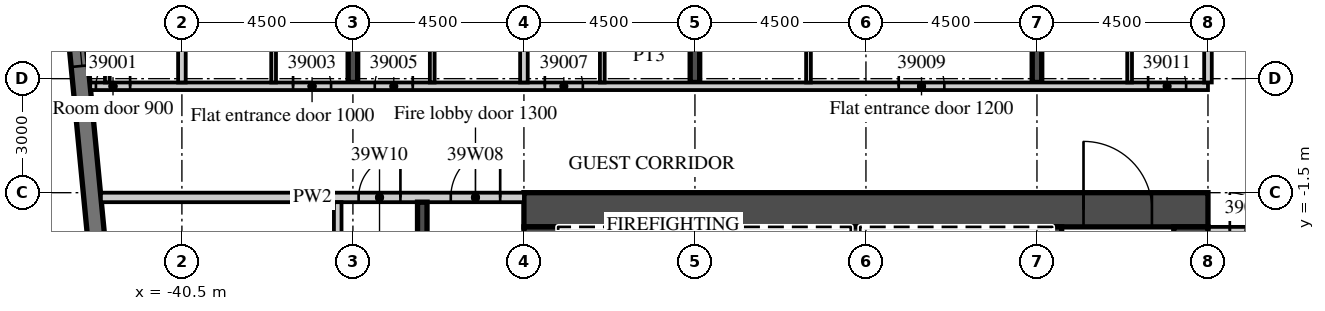
"""IFC4 building model, lengths in metres.
Left out: names, types, materials, properties, quantities, classifications, styles, units other than length and angle.
Written with IfcOpenShell. Run it as: python <this file> out.ifc"""

import sys

from ifc_helpers import new_model, si_unit, direction, frame, frame_2d, origin, place, context, subcontext, project, spatial, rectangle, extrude, element, fill, save


model = new_model("IFC4")
c1 = context("Model", 3, precision=1e-05, world=origin(), true_north=direction((0.0, 1.0)))
c2 = subcontext(c1, "Body", "Model", "MODEL_VIEW")
j1 = project(units=[si_unit("LENGTHUNIT", "METRE"), si_unit("PLANEANGLEUNIT", "RADIAN")], contexts=[c1])
p1 = place(None, origin())
s1 = spatial("IfcSite", under=j1, at=p1, CompositionType="ELEMENT")
p2 = place(p1, origin())
s2 = spatial("IfcBuilding", under=s1, at=p2, CompositionType="ELEMENT")
p3 = place(p2, frame((0.0, 0.0, 170.2)))
s3 = spatial("IfcBuildingStorey", under=s2, at=p3, CompositionType="ELEMENT", Elevation=170.2)
p4 = place(p3, frame((-36.0, 1.4, 0.0), z_axis=(0.0, 0.0, 1.0), x_axis=(0.0, 1.0, 0.0)))
e1 = element("IfcWall", 1, at=p4, inside=s3, PredefinedType="SHEAR", context=c2, shape_type="SweptSolid", body=[
    extrude(rectangle(XDim=15.401, YDim=0.25, at=frame_2d((7.701, 0.0))), origin(), (0.0, 0.0, 1.0), 3.3),
])
p5 = place(p3, frame((-27.0, 1.4, 0.0), z_axis=(0.0, 0.0, 1.0), x_axis=(0.0, 1.0, 0.0)))
e2 = element("IfcWall", 2, at=p5, inside=s3, PredefinedType="SHEAR", context=c2, shape_type="SweptSolid", body=[
    extrude(rectangle(XDim=16.268, YDim=0.25, at=frame_2d((8.134, 0.0))), origin(), (0.0, 0.0, 1.0), 3.3),
])
p6 = place(p3, frame((-18.0, 1.4, 0.0), z_axis=(0.0, 0.0, 1.0), x_axis=(0.0, 1.0, 0.0)))
e3 = element("IfcWall", 3, at=p6, inside=s3, PredefinedType="SHEAR", context=c2, shape_type="SweptSolid", body=[
    extrude(rectangle(XDim=17.134, YDim=0.25, at=frame_2d((8.567, 0.0))), origin(), (0.0, 0.0, 1.0), 3.3),
])
p7 = place(p3, frame((-44.214, 12.466, 0.0), z_axis=(0.0, 0.0, 1.0), x_axis=(0.095847314626, -0.995396047952, 0.0)))
e4 = element("IfcWall", 4, at=p7, inside=s3, PredefinedType="SOLIDWALL", context=c2, shape_type="SweptSolid", body=[
    extrude(rectangle(XDim=34.0, YDim=0.45, at=frame_2d((17.0, 0.0))), origin(), (0.0, 0.0, 1.0), 3.02),
])
p8 = place(p7, frame((2.865, 0.0, 0.45)))
e5 = element("IfcOpeningElement", 5, at=p8, cuts=e4, PredefinedType="OPENING", context=c2, shape_type="SweptSolid", body=[
    extrude(rectangle(XDim=3.3, YDim=2.25, at=frame_2d((1.65, 1.125))), frame((0.0, 0.235, 0.0), z_axis=(0.0, -1.0, 0.0), x_axis=(1.0, 0.0, 0.0)), (0.0, 0.0, 1.0), 0.47),
])
p9 = place(p7, frame((7.386, 0.0, 0.45)))
e6 = element("IfcOpeningElement", 6, at=p9, cuts=e4, PredefinedType="OPENING", context=c2, shape_type="SweptSolid", body=[
    extrude(rectangle(XDim=3.3, YDim=2.25, at=frame_2d((1.65, 1.125))), frame((0.0, 0.235, 0.0), z_axis=(0.0, -1.0, 0.0), x_axis=(1.0, 0.0, 0.0)), (0.0, 0.0, 1.0), 0.47),
])
p10 = place(p3, frame((-42.913, 1.3, 0.0), z_axis=(0.0, 0.0, 1.0), x_axis=(1.0, 0.0, 0.0)))
e7 = element("IfcWall", 7, at=p10, inside=s3, PredefinedType="PARTITIONING", context=c2, shape_type="SweptSolid", body=[
    extrude(rectangle(XDim=29.413, YDim=0.2, at=frame_2d((14.707, 0.0))), origin(), (0.0, 0.0, 1.0), 3.02),
])
p11 = place(p10, frame((0.15, 0.0, 0.0)))
e8 = element("IfcOpeningElement", 8, at=p11, cuts=e7, PredefinedType="OPENING", context=c2, shape_type="SweptSolid", body=[
    extrude(rectangle(XDim=0.9, YDim=2.1, at=frame_2d((0.45, 1.05))), frame((0.0, 0.11, 0.0), z_axis=(0.0, -1.0, 0.0), x_axis=(1.0, 0.0, 0.0)), (0.0, 0.0, 1.0), 0.22),
])
p12 = place(p10, frame((5.338, 0.0, 0.0)))
e9 = element("IfcOpeningElement", 9, at=p12, cuts=e7, PredefinedType="OPENING", context=c2, shape_type="SweptSolid", body=[
    extrude(rectangle(XDim=1.0, YDim=2.1, at=frame_2d((0.5, 1.05))), frame((0.0, 0.11, 0.0), z_axis=(0.0, -1.0, 0.0), x_axis=(1.0, 0.0, 0.0)), (0.0, 0.0, 1.0), 0.22),
])
p13 = place(p10, frame((7.488, 0.0, 0.0)))
e10 = element("IfcOpeningElement", 10, at=p13, cuts=e7, PredefinedType="OPENING", context=c2, shape_type="SweptSolid", body=[
    extrude(rectangle(XDim=1.0, YDim=2.1, at=frame_2d((0.5, 1.05))), frame((0.0, 0.11, 0.0), z_axis=(0.0, -1.0, 0.0), x_axis=(1.0, 0.0, 0.0)), (0.0, 0.0, 1.0), 0.22),
])
p14 = place(p10, frame((11.963, 0.0, 0.0)))
e11 = element("IfcOpeningElement", 11, at=p14, cuts=e7, PredefinedType="OPENING", context=c2, shape_type="SweptSolid", body=[
    extrude(rectangle(XDim=1.0, YDim=2.1, at=frame_2d((0.5, 1.05))), frame((0.0, 0.11, 0.0), z_axis=(0.0, -1.0, 0.0), x_axis=(1.0, 0.0, 0.0)), (0.0, 0.0, 1.0), 0.22),
])
p15 = place(p10, frame((21.275, 0.0, 0.0)))
e12 = element("IfcOpeningElement", 12, at=p15, cuts=e7, PredefinedType="OPENING", context=c2, shape_type="SweptSolid", body=[
    extrude(rectangle(XDim=1.2, YDim=2.1, at=frame_2d((0.6, 1.05))), frame((0.0, 0.11, 0.0), z_axis=(0.0, -1.0, 0.0), x_axis=(1.0, 0.0, 0.0)), (0.0, 0.0, 1.0), 0.22),
])
p16 = place(p10, frame((27.838, 0.0, 0.0)))
e13 = element("IfcOpeningElement", 13, at=p16, cuts=e7, PredefinedType="OPENING", context=c2, shape_type="SweptSolid", body=[
    extrude(rectangle(XDim=1.0, YDim=2.1, at=frame_2d((0.5, 1.05))), frame((0.0, 0.11, 0.0), z_axis=(0.0, -1.0, 0.0), x_axis=(1.0, 0.0, 0.0)), (0.0, 0.0, 1.0), 0.22),
])
p17 = place(p3, frame((-40.5, 1.4, 0.0), z_axis=(0.0, 0.0, 1.0), x_axis=(0.0, 1.0, 0.0)))
e14 = element("IfcWall", 14, at=p17, inside=s3, PredefinedType="PARTITIONING", context=c2, shape_type="SweptSolid", body=[
    extrude(rectangle(XDim=14.99, YDim=0.2, at=frame_2d((7.495, 0.0))), origin(), (0.0, 0.0, 1.0), 3.02),
])
p18 = place(p3, frame((-42.462, 1.4, 0.0), z_axis=(0.0, 0.0, 1.0), x_axis=(0.0, 1.0, 0.0)))
e15 = element("IfcWall", 15, at=p18, inside=s3, PredefinedType="PARTITIONING", context=c2, shape_type="SweptSolid", body=[
    extrude(rectangle(XDim=4.028, YDim=0.125, at=frame_2d((2.014, 0.0))), origin(), (0.0, 0.0, 1.0), 3.02),
])
p19 = place(p18, frame((2.45, 0.0, 0.0)))
e16 = element("IfcOpeningElement", 16, at=p19, cuts=e15, PredefinedType="OPENING", context=c2, shape_type="SweptSolid", body=[
    extrude(rectangle(XDim=0.9, YDim=2.1, at=frame_2d((0.45, 1.05))), frame((0.0, 0.073, 0.0), z_axis=(0.0, -1.0, 0.0), x_axis=(1.0, 0.0, 0.0)), (0.0, 0.0, 1.0), 0.145),
])
p20 = place(p3, frame((-38.087, 1.4, 0.0), z_axis=(0.0, 0.0, 1.0), x_axis=(0.0, 1.0, 0.0)))
e17 = element("IfcWall", 17, at=p20, inside=s3, PredefinedType="PARTITIONING", context=c2, shape_type="SweptSolid", body=[
    extrude(rectangle(XDim=5.725, YDim=0.125, at=frame_2d((2.863, 0.0))), origin(), (0.0, 0.0, 1.0), 3.02),
])
p21 = place(p20, frame((2.45, 0.0, 0.0)))
e18 = element("IfcOpeningElement", 18, at=p21, cuts=e17, PredefinedType="OPENING", context=c2, shape_type="SweptSolid", body=[
    extrude(rectangle(XDim=0.9, YDim=2.1, at=frame_2d((0.45, 1.05))), frame((0.0, 0.073, 0.0), z_axis=(0.0, -1.0, 0.0), x_axis=(1.0, 0.0, 0.0)), (0.0, 0.0, 1.0), 0.145),
])
p22 = place(p3, frame((-31.5, 1.4, 0.0), z_axis=(0.0, 0.0, 1.0), x_axis=(0.0, 1.0, 0.0)))
e19 = element("IfcWall", 19, at=p22, inside=s3, PredefinedType="PARTITIONING", context=c2, shape_type="SweptSolid", body=[
    extrude(rectangle(XDim=15.856, YDim=0.2, at=frame_2d((7.928, 0.0))), origin(), (0.0, 0.0, 1.0), 3.02),
])
p23 = place(p3, frame((-33.913, 1.4, 0.0), z_axis=(0.0, 0.0, 1.0), x_axis=(0.0, 1.0, 0.0)))
e20 = element("IfcWall", 20, at=p23, inside=s3, PredefinedType="PARTITIONING", context=c2, shape_type="SweptSolid", body=[
    extrude(rectangle(XDim=5.725, YDim=0.125, at=frame_2d((2.863, 0.0))), origin(), (0.0, 0.0, 1.0), 3.02),
])
p24 = place(p23, frame((2.45, 0.0, 0.0)))
e21 = element("IfcOpeningElement", 21, at=p24, cuts=e20, PredefinedType="OPENING", context=c2, shape_type="SweptSolid", body=[
    extrude(rectangle(XDim=0.9, YDim=2.1, at=frame_2d((0.45, 1.05))), frame((0.0, 0.073, 0.0), z_axis=(0.0, -1.0, 0.0), x_axis=(1.0, 0.0, 0.0)), (0.0, 0.0, 1.0), 0.145),
])
p25 = place(p3, frame((-29.438, 1.4, 0.0), z_axis=(0.0, 0.0, 1.0), x_axis=(0.0, 1.0, 0.0)))
e22 = element("IfcWall", 22, at=p25, inside=s3, PredefinedType="PARTITIONING", context=c2, shape_type="SweptSolid", body=[
    extrude(rectangle(XDim=5.725, YDim=0.125, at=frame_2d((2.863, 0.0))), origin(), (0.0, 0.0, 1.0), 3.02),
])
p26 = place(p25, frame((2.45, 0.0, 0.0)))
e23 = element("IfcOpeningElement", 23, at=p26, cuts=e22, PredefinedType="OPENING", context=c2, shape_type="SweptSolid", body=[
    extrude(rectangle(XDim=0.9, YDim=2.1, at=frame_2d((0.45, 1.05))), frame((0.0, 0.073, 0.0), z_axis=(0.0, -1.0, 0.0), x_axis=(1.0, 0.0, 0.0)), (0.0, 0.0, 1.0), 0.145),
])
p27 = place(p3, frame((-24.012, 1.4, 0.0), z_axis=(0.0, 0.0, 1.0), x_axis=(0.0, 1.0, 0.0)))
e24 = element("IfcWall", 24, at=p27, inside=s3, PredefinedType="PARTITIONING", context=c2, shape_type="SweptSolid", body=[
    extrude(rectangle(XDim=5.725, YDim=0.125, at=frame_2d((2.863, 0.0))), origin(), (0.0, 0.0, 1.0), 3.02),
])
p28 = place(p27, frame((2.45, 0.0, 0.0)))
e25 = element("IfcOpeningElement", 25, at=p28, cuts=e24, PredefinedType="OPENING", context=c2, shape_type="SweptSolid", body=[
    extrude(rectangle(XDim=0.9, YDim=2.1, at=frame_2d((0.45, 1.05))), frame((0.0, 0.073, 0.0), z_axis=(0.0, -1.0, 0.0), x_axis=(1.0, 0.0, 0.0)), (0.0, 0.0, 1.0), 0.145),
])
p29 = place(p3, frame((-13.5, 1.4, 0.0), z_axis=(0.0, 0.0, 1.0), x_axis=(0.0, 1.0, 0.0)))
e26 = element("IfcWall", 26, at=p29, inside=s3, PredefinedType="PARTITIONING", context=c2, shape_type="SweptSolid", body=[
    extrude(rectangle(XDim=17.59, YDim=0.2, at=frame_2d((8.795, 0.0))), origin(), (0.0, 0.0, 1.0), 3.02),
])
p30 = place(p3, frame((-15.562, 1.4, 0.0), z_axis=(0.0, 0.0, 1.0), x_axis=(0.0, 1.0, 0.0)))
e27 = element("IfcWall", 27, at=p30, inside=s3, PredefinedType="PARTITIONING", context=c2, shape_type="SweptSolid", body=[
    extrude(rectangle(XDim=5.725, YDim=0.125, at=frame_2d((2.863, 0.0))), origin(), (0.0, 0.0, 1.0), 3.02),
])
p31 = place(p30, frame((2.45, 0.0, 0.0)))
e28 = element("IfcOpeningElement", 28, at=p31, cuts=e27, PredefinedType="OPENING", context=c2, shape_type="SweptSolid", body=[
    extrude(rectangle(XDim=0.9, YDim=2.1, at=frame_2d((0.45, 1.05))), frame((0.0, 0.073, 0.0), z_axis=(0.0, -1.0, 0.0), x_axis=(1.0, 0.0, 0.0)), (0.0, 0.0, 1.0), 0.145),
])
p32 = place(p3, frame((-13.5, -2.5, 0.0), z_axis=(0.0, 0.0, 1.0), x_axis=(1.0, 0.0, 0.0)))
e29 = element("IfcWall", 29, at=p32, inside=s3, PredefinedType="PARTITIONING", context=c2, shape_type="SweptSolid", body=[
    extrude(rectangle(XDim=27.0, YDim=0.2, at=frame_2d((13.5, 0.0))), origin(), (0.0, 0.0, 1.0), 3.02),
])
p33 = place(p32, frame((0.575, 0.0, 0.0)))
e30 = element("IfcOpeningElement", 30, at=p33, cuts=e29, PredefinedType="OPENING", context=c2, shape_type="SweptSolid", body=[
    extrude(rectangle(XDim=1.0, YDim=2.1, at=frame_2d((0.5, 1.05))), frame((0.0, 0.11, 0.0), z_axis=(0.0, -1.0, 0.0), x_axis=(1.0, 0.0, 0.0)), (0.0, 0.0, 1.0), 0.22),
])
p34 = place(p32, frame((9.863, 0.0, 0.0)))
e31 = element("IfcOpeningElement", 31, at=p34, cuts=e29, PredefinedType="OPENING", context=c2, shape_type="SweptSolid", body=[
    extrude(rectangle(XDim=1.2, YDim=2.1, at=frame_2d((0.6, 1.05))), frame((0.0, 0.11, 0.0), z_axis=(0.0, -1.0, 0.0), x_axis=(1.0, 0.0, 0.0)), (0.0, 0.0, 1.0), 0.22),
])
p35 = place(p32, frame((15.938, 0.0, 0.0)))
e32 = element("IfcOpeningElement", 32, at=p35, cuts=e29, PredefinedType="OPENING", context=c2, shape_type="SweptSolid", body=[
    extrude(rectangle(XDim=1.2, YDim=2.1, at=frame_2d((0.6, 1.05))), frame((0.0, 0.11, 0.0), z_axis=(0.0, -1.0, 0.0), x_axis=(1.0, 0.0, 0.0)), (0.0, 0.0, 1.0), 0.22),
])
p36 = place(p32, frame((23.075, 0.0, 0.0)))
e33 = element("IfcOpeningElement", 33, at=p36, cuts=e29, PredefinedType="OPENING", context=c2, shape_type="SweptSolid", body=[
    extrude(rectangle(XDim=1.0, YDim=2.1, at=frame_2d((0.5, 1.05))), frame((0.0, 0.11, 0.0), z_axis=(0.0, -1.0, 0.0), x_axis=(1.0, 0.0, 0.0)), (0.0, 0.0, 1.0), 0.22),
])
p37 = place(p3, frame((-31.5, -1.95, 0.0), z_axis=(0.0, 0.0, 1.0), x_axis=(1.0, 0.0, 0.0)))
e34 = element("IfcWall", 34, at=p37, inside=s3, PredefinedType="SHEAR", context=c2, shape_type="SweptSolid", body=[
    extrude(rectangle(XDim=18.0, YDim=0.9, at=frame_2d((9.0, 0.0))), origin(), (0.0, 0.0, 1.0), 3.02),
])
p38 = place(p37, frame((14.725, 0.0, 0.0)))
e35 = element("IfcOpeningElement", 35, at=p38, cuts=e34, PredefinedType="OPENING", context=c2, shape_type="SweptSolid", body=[
    extrude(rectangle(XDim=1.8, YDim=2.1, at=frame_2d((0.9, 1.05))), frame((0.0, 0.46, 0.0), z_axis=(0.0, -1.0, 0.0), x_axis=(1.0, 0.0, 0.0)), (0.0, 0.0, 1.0), 0.92),
])
p39 = place(p3, frame((-31.05, -15.2, 0.0), z_axis=(0.0, 0.0, 1.0), x_axis=(0.0, 1.0, 0.0)))
e36 = element("IfcWall", 36, at=p39, inside=s3, PredefinedType="SHEAR", context=c2, shape_type="SweptSolid", body=[
    extrude(rectangle(XDim=12.8, YDim=0.9, at=frame_2d((6.4, 0.0))), origin(), (0.0, 0.0, 1.0), 3.02),
])
p40 = place(p39, frame((11.5, 0.0, 0.0)))
e37 = element("IfcOpeningElement", 37, at=p40, cuts=e36, PredefinedType="OPENING", context=c2, shape_type="SweptSolid", body=[
    extrude(rectangle(XDim=1.1, YDim=2.1, at=frame_2d((0.55, 1.05))), frame((0.0, 0.46, 0.0), z_axis=(0.0, -1.0, 0.0), x_axis=(1.0, 0.0, 0.0)), (0.0, 0.0, 1.0), 0.92),
])
p41 = place(p3, frame((-13.95, -14.6, 0.0), z_axis=(0.0, 0.0, 1.0), x_axis=(0.0, 1.0, 0.0)))
e38 = element("IfcWall", 38, at=p41, inside=s3, PredefinedType="SHEAR", context=c2, shape_type="SweptSolid", body=[
    extrude(rectangle(XDim=12.2, YDim=0.9, at=frame_2d((6.1, 0.0))), origin(), (0.0, 0.0, 1.0), 3.02),
])
p42 = place(p3, frame((-17.475, -5.55, 0.0), z_axis=(0.0, 0.0, 1.0), x_axis=(0.0, 1.0, 0.0)))
e39 = element("IfcWall", 39, at=p42, inside=s3, PredefinedType="SHEAR", context=c2, shape_type="SweptSolid", body=[
    extrude(rectangle(XDim=3.15, YDim=0.25, at=frame_2d((1.575, 0.0))), origin(), (0.0, 0.0, 1.0), 3.02),
])
for number, where, z_axis, x_axis in (
    (40, (-27.975, -5.3, 0.0), (0.0, 0.0, 1.0), (0.0, 1.0, 0.0)),
    (41, (-22.775, -5.3, 0.0), (0.0, 0.0, 1.0), (0.0, 1.0, 0.0)),
):
    element("IfcWall", number, at=place(p3, frame(where, z_axis=z_axis, x_axis=x_axis)), inside=s3, PredefinedType="SHEAR", context=c2, shape_type="SweptSolid", body=[
        extrude(rectangle(XDim=2.9, YDim=0.25, at=frame_2d((1.45, 0.0))), origin(), (0.0, 0.0, 1.0), 3.02),
    ])
p43 = place(p3, frame((-42.632, -1.625, 0.0), z_axis=(0.0, 0.0, 1.0), x_axis=(1.0, 0.0, 0.0)))
e42 = element("IfcWall", 42, at=p43, inside=s3, PredefinedType="PARTITIONING", context=c2, shape_type="SweptSolid", body=[
    extrude(rectangle(XDim=11.132, YDim=0.25, at=frame_2d((5.566, 0.0))), origin(), (0.0, 0.0, 1.0), 3.02),
])
p44 = place(p43, frame((9.207, 0.0, 0.0)))
e43 = element("IfcOpeningElement", 43, at=p44, cuts=e42, PredefinedType="OPENING", context=c2, shape_type="SweptSolid", body=[
    extrude(rectangle(XDim=1.3, YDim=2.1, at=frame_2d((0.65, 1.05))), frame((0.0, 0.135, 0.0), z_axis=(0.0, -1.0, 0.0), x_axis=(1.0, 0.0, 0.0)), (0.0, 0.0, 1.0), 0.27),
])
p45 = place(p43, frame((6.781, 0.0, 0.0)))
e44 = element("IfcOpeningElement", 44, at=p45, cuts=e42, PredefinedType="OPENING", context=c2, shape_type="SweptSolid", body=[
    extrude(rectangle(XDim=1.1, YDim=2.1, at=frame_2d((0.55, 1.05))), frame((0.0, 0.135, 0.0), z_axis=(0.0, -1.0, 0.0), x_axis=(1.0, 0.0, 0.0)), (0.0, 0.0, 1.0), 0.27),
])
p46 = place(p3, frame((-34.175, -10.1, 0.0), z_axis=(0.0, 0.0, 1.0), x_axis=(0.0, 1.0, 0.0)))
e45 = element("IfcWall", 45, at=p46, inside=s3, PredefinedType="SHEAR", context=c2, shape_type="SweptSolid", body=[
    extrude(rectangle(XDim=8.35, YDim=0.25, at=frame_2d((4.175, 0.0))), origin(), (0.0, 0.0, 1.0), 3.02),
])
p47 = place(p3, frame((-36.4, -17.7, 0.0), z_axis=(0.0, 0.0, 1.0), x_axis=(0.0, 1.0, 0.0)))
e46 = element("IfcWall", 46, at=p47, inside=s3, PredefinedType="PARTITIONING", context=c2, shape_type="SweptSolid", body=[
    extrude(rectangle(XDim=15.95, YDim=0.2, at=frame_2d((7.975, 0.0))), origin(), (0.0, 0.0, 1.0), 3.02),
])
p48 = place(p47, frame((0.35, 0.0, 0.0)))
e47 = element("IfcOpeningElement", 47, at=p48, cuts=e46, PredefinedType="OPENING", context=c2, shape_type="SweptSolid", body=[
    extrude(rectangle(XDim=0.9, YDim=2.1, at=frame_2d((0.45, 1.05))), frame((0.0, 0.11, 0.0), z_axis=(0.0, -1.0, 0.0), x_axis=(1.0, 0.0, 0.0)), (0.0, 0.0, 1.0), 0.22),
])
p49 = place(p9, origin())
e48 = element("IfcWindow", 48, at=p49, inside=s3, PartitioningType="SINGLE_PANEL", PredefinedType="WINDOW", context=c2, shape_type="SweptSolid", body=[
    extrude(rectangle(XDim=3.3, YDim=2.25, at=frame_2d((1.65, 1.125))), frame((0.0, 0.09, 0.0), z_axis=(0.0, -1.0, 0.0), x_axis=(1.0, 0.0, 0.0)), (0.0, 0.0, 1.0), 0.06),
])
fill(e6, e48)
p50 = place(p11, origin())
e49 = element("IfcDoor", 49, at=p50, inside=s3, OperationType="SINGLE_SWING_RIGHT", PredefinedType="DOOR", context=c2, shape_type="SweptSolid", body=[
    extrude(rectangle(XDim=0.9, YDim=2.1, at=frame_2d((0.45, 1.05))), frame((0.0, 0.025, 0.0), z_axis=(0.0, -1.0, 0.0), x_axis=(1.0, 0.0, 0.0)), (0.0, 0.0, 1.0), 0.05),
])
fill(e8, e49)
p51 = place(p12, origin())
e50 = element("IfcDoor", 50, at=p51, inside=s3, OperationType="SINGLE_SWING_LEFT", PredefinedType="DOOR", context=c2, shape_type="SweptSolid", body=[
    extrude(rectangle(XDim=1.0, YDim=2.1, at=frame_2d((0.5, 1.05))), frame((0.0, 0.025, 0.0), z_axis=(0.0, -1.0, 0.0), x_axis=(1.0, 0.0, 0.0)), (0.0, 0.0, 1.0), 0.05),
])
fill(e9, e50)
p52 = place(p13, origin())
e51 = element("IfcDoor", 51, at=p52, inside=s3, OperationType="SINGLE_SWING_RIGHT", PredefinedType="DOOR", context=c2, shape_type="SweptSolid", body=[
    extrude(rectangle(XDim=1.0, YDim=2.1, at=frame_2d((0.5, 1.05))), frame((0.0, 0.025, 0.0), z_axis=(0.0, -1.0, 0.0), x_axis=(1.0, 0.0, 0.0)), (0.0, 0.0, 1.0), 0.05),
])
fill(e10, e51)
p53 = place(p14, origin())
e52 = element("IfcDoor", 52, at=p53, inside=s3, OperationType="SINGLE_SWING_LEFT", PredefinedType="DOOR", context=c2, shape_type="SweptSolid", body=[
    extrude(rectangle(XDim=1.0, YDim=2.1, at=frame_2d((0.5, 1.05))), frame((0.0, 0.025, 0.0), z_axis=(0.0, -1.0, 0.0), x_axis=(1.0, 0.0, 0.0)), (0.0, 0.0, 1.0), 0.05),
])
fill(e11, e52)
p54 = place(p15, origin())
e53 = element("IfcDoor", 53, at=p54, inside=s3, OperationType="SINGLE_SWING_LEFT", PredefinedType="DOOR", context=c2, shape_type="SweptSolid", body=[
    extrude(rectangle(XDim=1.2, YDim=2.1, at=frame_2d((0.6, 1.05))), frame((0.0, 0.025, 0.0), z_axis=(0.0, -1.0, 0.0), x_axis=(1.0, 0.0, 0.0)), (0.0, 0.0, 1.0), 0.05),
])
fill(e12, e53)
p55 = place(p16, origin())
e54 = element("IfcDoor", 54, at=p55, inside=s3, OperationType="SINGLE_SWING_LEFT", PredefinedType="DOOR", context=c2, shape_type="SweptSolid", body=[
    extrude(rectangle(XDim=1.0, YDim=2.1, at=frame_2d((0.5, 1.05))), frame((0.0, 0.025, 0.0), z_axis=(0.0, -1.0, 0.0), x_axis=(1.0, 0.0, 0.0)), (0.0, 0.0, 1.0), 0.05),
])
fill(e13, e54)
p56 = place(p33, origin())
e55 = element("IfcDoor", 55, at=p56, inside=s3, OperationType="SINGLE_SWING_LEFT", PredefinedType="DOOR", context=c2, shape_type="SweptSolid", body=[
    extrude(rectangle(XDim=1.0, YDim=2.1, at=frame_2d((0.5, 1.05))), frame((0.0, 0.025, 0.0), z_axis=(0.0, -1.0, 0.0), x_axis=(1.0, 0.0, 0.0)), (0.0, 0.0, 1.0), 0.05),
])
fill(e30, e55)
p57 = place(p38, origin())
e56 = element("IfcDoor", 56, at=p57, inside=s3, OperationType="DOUBLE_DOOR_DOUBLE_SWING", PredefinedType="DOOR", context=c2, shape_type="SweptSolid", body=[
    extrude(rectangle(XDim=1.8, YDim=2.1, at=frame_2d((0.9, 1.05))), frame((0.0, 0.025, 0.0), z_axis=(0.0, -1.0, 0.0), x_axis=(1.0, 0.0, 0.0)), (0.0, 0.0, 1.0), 0.05),
])
fill(e35, e56)
p58 = place(p44, origin())
e57 = element("IfcDoor", 57, at=p58, inside=s3, OperationType="SINGLE_SWING_RIGHT", PredefinedType="DOOR", context=c2, shape_type="SweptSolid", body=[
    extrude(rectangle(XDim=1.3, YDim=2.1, at=frame_2d((0.65, 1.05))), frame((0.0, 0.025, 0.0), z_axis=(0.0, -1.0, 0.0), x_axis=(1.0, 0.0, 0.0)), (0.0, 0.0, 1.0), 0.05),
])
fill(e43, e57)
p59 = place(p45, origin())
e58 = element("IfcDoor", 58, at=p59, inside=s3, OperationType="SINGLE_SWING_RIGHT", PredefinedType="DOOR", context=c2, shape_type="SweptSolid", body=[
    extrude(rectangle(XDim=1.1, YDim=2.1, at=frame_2d((0.55, 1.05))), frame((0.0, 0.025, 0.0), z_axis=(0.0, -1.0, 0.0), x_axis=(1.0, 0.0, 0.0)), (0.0, 0.0, 1.0), 0.05),
])
fill(e44, e58)
save(model, sys.argv[1])
